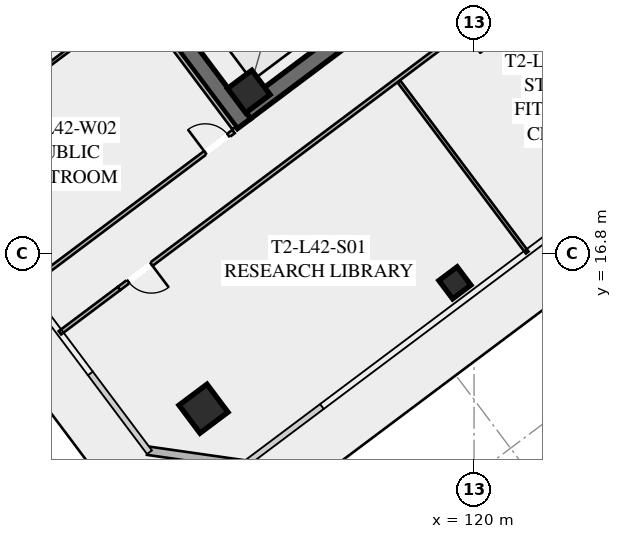
"""IFC4 building model, lengths in metres.
Left out: names, types, materials, properties, quantities, classifications, styles, units other than length and angle.
Written with IfcOpenShell. Run it as: python <this file> out.ifc"""

import sys

from ifc_helpers import new_model, si_unit, direction, frame, frame_2d, origin, origin_2d, place, context, subcontext, project, spatial, rectangle, hollow_rectangle, extrude, element, fill, save


model = new_model("IFC4")
c1 = context("Model", 3, precision=1e-05, world=origin(), true_north=direction((0.0, 1.0)))
c2 = subcontext(c1, "Body", "Model", "MODEL_VIEW")
j1 = project(units=[si_unit("LENGTHUNIT", "METRE"), si_unit("PLANEANGLEUNIT", "RADIAN")], contexts=[c1])
p1 = place(None, origin())
s1 = spatial("IfcSite", under=j1, at=p1, CompositionType="ELEMENT")
p2 = place(p1, origin())
s2 = spatial("IfcBuilding", under=s1, at=p2, CompositionType="ELEMENT")
p3 = place(p2, frame((0.0, 0.0, 157.0)))
s3 = spatial("IfcBuildingStorey", under=s2, at=p3, CompositionType="ELEMENT", Elevation=157.0)
p4 = place(p3, frame((112.436, 21.077, 0.0), z_axis=(0.0, 0.0, 1.0), x_axis=(-0.600005007985, 0.799996243986, 0.0)))
e1 = element("IfcWall", 1, at=p4, inside=s3, PredefinedType="SHEAR", context=c2, shape_type="SweptSolid", body=[
    extrude(rectangle(XDim=15.6, YDim=0.55, at=frame_2d((7.8, 0.0))), origin(), (0.0, 0.0, 1.0), 3.55),
])
p5 = place(p3, frame((124.539, 30.498, 0.0), z_axis=(0.0, 0.0, 1.0), x_axis=(-0.799998054672, -0.600002593761, 0.0)))
e2 = element("IfcWall", 2, at=p5, inside=s3, PredefinedType="SHEAR", context=c2, shape_type="SweptSolid", body=[
    extrude(rectangle(XDim=15.06, YDim=0.55, at=frame_2d((7.53, 0.0))), origin(), (0.0, 0.0, 1.0), 3.55),
])
p6 = place(p5, frame((9.23, 0.0, 0.0)))
e3 = element("IfcOpeningElement", 3, at=p6, cuts=e2, PredefinedType="OPENING", context=c2, shape_type="SweptSolid", body=[
    extrude(rectangle(XDim=1.25, YDim=2.25, at=frame_2d((0.625, 1.125))), frame((0.0, 0.285, 0.0), z_axis=(0.0, -1.0, 0.0), x_axis=(1.0, 0.0, 0.0)), (0.0, 0.0, 1.0), 0.57),
])
p7 = place(p5, frame((4.18, 0.0, 0.0)))
e4 = element("IfcOpeningElement", 4, at=p7, cuts=e2, PredefinedType="OPENING", context=c2, shape_type="SweptSolid", body=[
    extrude(rectangle(XDim=1.25, YDim=2.25, at=frame_2d((0.625, 1.125))), frame((0.0, 0.285, 0.0), z_axis=(0.0, -1.0, 0.0), x_axis=(1.0, 0.0, 0.0)), (0.0, 0.0, 1.0), 0.57),
])
p8 = place(p3, frame((112.59, 22.13, 0.0), z_axis=(0.0, 0.0, 1.0), x_axis=(0.799999996291, 0.600000004945, 0.0)))
e5 = element("IfcColumn", 5, at=p8, inside=s3, PredefinedType="COLUMN", context=c2, shape_type="SweptSolid", body=[
    extrude(hollow_rectangle(XDim=1.0, YDim=1.0, WallThickness=0.04, at=origin_2d()), origin(), (0.0, 0.0, 1.0), 3.37),
])
p9 = place(p3, frame((111.1, 11.7, -0.175), z_axis=(0.0, 0.0, 1.0), x_axis=(0.799999996291, 0.600000004945, 0.0)))
e6 = element("IfcColumn", 6, at=p9, inside=s3, PredefinedType="COLUMN", context=c2, shape_type="SweptSolid", body=[
    extrude(hollow_rectangle(XDim=1.15, YDim=1.15, WallThickness=0.045, at=origin_2d()), origin(), (0.0, 0.0, 1.0), 3.545),
])
p10 = place(p3, frame((119.37, 15.84, -0.175), z_axis=(0.0, 0.0, 1.0), x_axis=(0.799999996291, 0.600000004945, 0.0)))
e7 = element("IfcColumn", 7, at=p10, inside=s3, PredefinedType="COLUMN", context=c2, shape_type="SweptSolid", body=[
    extrude(hollow_rectangle(XDim=0.75, YDim=0.75, WallThickness=0.032, at=origin_2d()), origin(), (0.0, 0.0, 1.0), 3.545),
])
p11 = place(p3, frame((112.48, 9.86, 0.0), z_axis=(0.0, 0.0, 1.0), x_axis=(-0.989950994782, 0.141410847992, 0.0)))
e8 = element("IfcWall", 8, at=p11, inside=s3, PredefinedType="SOLIDWALL", context=c2, shape_type="SweptSolid", body=[
    extrude(rectangle(XDim=3.253, YDim=0.28, at=frame_2d((1.626, 0.0))), origin(), (0.0, 0.0, 1.0), 3.37),
])
p12 = place(p3, frame((131.282, 32.874, 0.0), z_axis=(0.0, 0.0, 1.0), x_axis=(-0.8, -0.6, 0.0)))
e9 = element("IfcWall", 9, at=p12, inside=s3, PredefinedType="PARTITIONING", context=c2, shape_type="SweptSolid", body=[
    extrude(rectangle(XDim=28.7, YDim=0.135, at=frame_2d((14.35, 0.0))), origin(), (0.0, 0.0, 1.0), 2.723),
])
p13 = place(p12, frame((27.37, 0.0, 0.0)))
e10 = element("IfcOpeningElement", 10, at=p13, cuts=e9, PredefinedType="OPENING", context=c2, shape_type="SweptSolid", body=[
    extrude(rectangle(XDim=0.95, YDim=2.05, at=frame_2d((0.475, 1.025))), frame((0.0, 0.077, 0.0), z_axis=(0.0, -1.0, 0.0), x_axis=(1.0, 0.0, 0.0)), (0.0, 0.0, 1.0), 0.155),
])
p14 = place(p12, frame((13.592, 0.0, 0.0)))
e11 = element("IfcOpeningElement", 11, at=p14, cuts=e9, PredefinedType="OPENING", context=c2, shape_type="SweptSolid", body=[
    extrude(rectangle(XDim=0.95, YDim=2.05, at=frame_2d((0.475, 1.025))), frame((0.0, 0.077, 0.0), z_axis=(0.0, -1.0, 0.0), x_axis=(1.0, 0.0, 0.0)), (0.0, 0.0, 1.0), 0.155),
])
p15 = place(p12, frame((0.38, 0.0, 0.0)))
e12 = element("IfcOpeningElement", 12, at=p15, cuts=e9, PredefinedType="OPENING", context=c2, shape_type="SweptSolid", body=[
    extrude(rectangle(XDim=0.95, YDim=2.05, at=frame_2d((0.475, 1.025))), frame((0.0, 0.077, 0.0), z_axis=(0.0, -1.0, 0.0), x_axis=(1.0, 0.0, 0.0)), (0.0, 0.0, 1.0), 0.155),
])
p16 = place(p3, frame((106.378, 14.196, 0.0), z_axis=(0.0, 0.0, 1.0), x_axis=(0.800012055778, 0.599983925293, 0.0)))
e13 = element("IfcWall", 13, at=p16, inside=s3, PredefinedType="PARTITIONING", context=c2, shape_type="SweptSolid", body=[
    extrude(rectangle(XDim=2.43, YDim=0.135, at=frame_2d((1.215, 0.0))), origin(), (0.0, 0.0, 1.0), 2.723),
])
p17 = place(p3, frame((121.748, 16.836, 0.0), z_axis=(0.0, 0.0, 1.0), x_axis=(-0.6, 0.8, 0.0)))
e14 = element("IfcWall", 14, at=p17, inside=s3, PredefinedType="PARTITIONING", context=c2, shape_type="SweptSolid", body=[
    extrude(rectangle(XDim=7.03, YDim=0.11, at=frame_2d((3.515, 0.0))), origin(), (0.0, 0.0, 1.0), 2.723),
])
p18 = place(p3, frame((112.104, 20.928, 0.0), z_axis=(0.0, 0.0, 1.0), x_axis=(-0.599994940075, 0.800003794918, 0.0)))
e15 = element("IfcWall", 15, at=p18, inside=s3, PredefinedType="PARTITIONING", context=c2, shape_type="SweptSolid", body=[
    extrude(rectangle(XDim=15.44, YDim=0.135, at=frame_2d((7.72, 0.0))), origin(), (0.0, 0.0, 1.0), 2.723),
])
p19 = place(p3, frame((105.256, 15.692, 0.0), z_axis=(0.0, 0.0, 1.0), x_axis=(0.799989708052, 0.600013722352, 0.0)))
e16 = element("IfcWall", 16, at=p19, inside=s3, PredefinedType="PARTITIONING", context=c2, shape_type="SweptSolid", body=[
    extrude(rectangle(XDim=8.54, YDim=0.135, at=frame_2d((4.27, 0.0))), origin(), (0.0, 0.0, 1.0), 2.723),
])
p20 = place(p19, frame((7.38, 0.0, 0.0)))
e17 = element("IfcOpeningElement", 17, at=p20, cuts=e16, PredefinedType="OPENING", context=c2, shape_type="SweptSolid", body=[
    extrude(rectangle(XDim=0.95, YDim=2.05, at=frame_2d((0.475, 1.025))), frame((0.0, 0.077, 0.0), z_axis=(0.0, -1.0, 0.0), x_axis=(1.0, 0.0, 0.0)), (0.0, 0.0, 1.0), 0.155),
])
p21 = place(p3, frame((102.016, 20.012, 0.0), z_axis=(0.0, 0.0, 1.0), x_axis=(0.799989708052, 0.600013722352, 0.0)))
e18 = element("IfcWall", 18, at=p21, inside=s3, PredefinedType="PARTITIONING", context=c2, shape_type="SweptSolid", body=[
    extrude(rectangle(XDim=8.54, YDim=0.11, at=frame_2d((4.27, 0.0))), origin(), (0.0, 0.0, 1.0), 2.723),
])
p22 = place(p13, origin())
e19 = element("IfcDoor", 19, at=p22, inside=s3, OperationType="SINGLE_SWING_LEFT", PredefinedType="DOOR", context=c2, shape_type="SweptSolid", body=[
    extrude(rectangle(XDim=0.95, YDim=2.05, at=frame_2d((0.475, 1.025))), frame((0.0, 0.025, 0.0), z_axis=(0.0, -1.0, 0.0), x_axis=(1.0, 0.0, 0.0)), (0.0, 0.0, 1.0), 0.05),
])
fill(e10, e19)
p23 = place(p20, origin())
e20 = element("IfcDoor", 20, at=p23, inside=s3, OperationType="SINGLE_SWING_LEFT", PredefinedType="DOOR", context=c2, shape_type="SweptSolid", body=[
    extrude(rectangle(XDim=0.95, YDim=2.05, at=frame_2d((0.475, 1.025))), frame((0.0, 0.025, 0.0), z_axis=(0.0, -1.0, 0.0), x_axis=(1.0, 0.0, 0.0)), (0.0, 0.0, 1.0), 0.05),
])
fill(e17, e20)
save(model, sys.argv[1])
